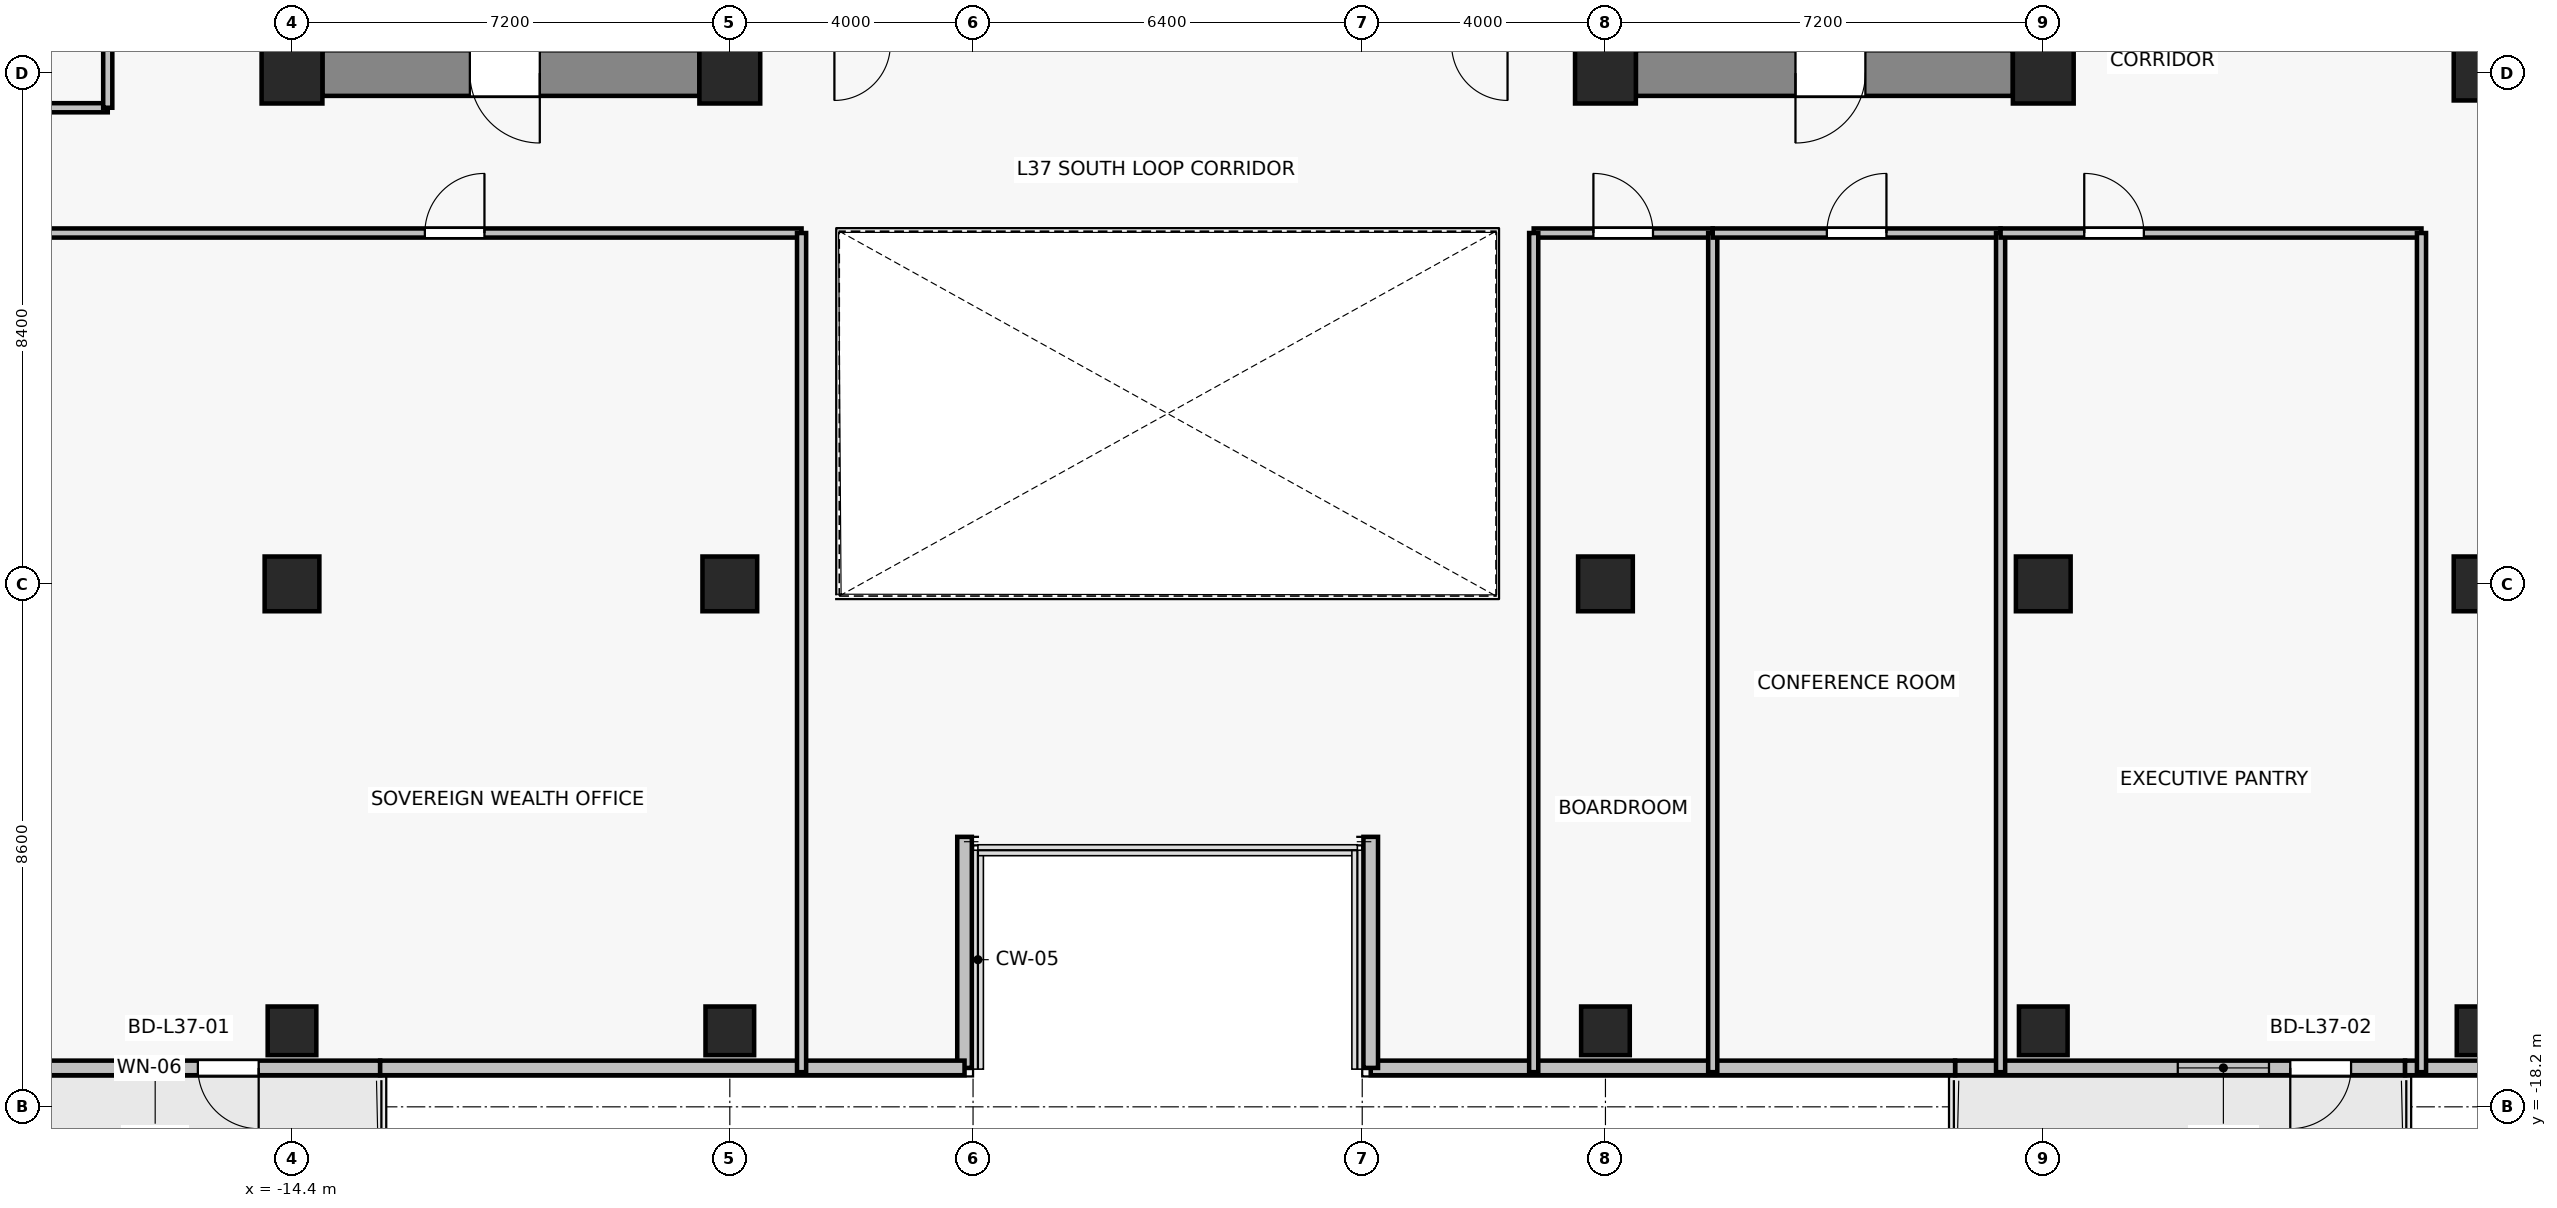
"""IFC4 building model, lengths in metres.
Left out: names, types, materials, properties, quantities, classifications, styles, units other than length and angle.
Written with IfcOpenShell. Run it as: python <this file> out.ifc"""

import sys

from ifc_helpers import new_model, si_unit, direction, frame, frame_2d, origin, origin_2d, place, context, subcontext, project, spatial, rectangle, extrude, source, transform, mapped, element, fill, save


model = new_model("IFC4")
c1 = context("Model", 3, precision=1e-05, world=origin(), true_north=direction((0.0, 1.0)))
c2 = subcontext(c1, "Body", "Model", "MODEL_VIEW")
j1 = project(units=[si_unit("LENGTHUNIT", "METRE"), si_unit("PLANEANGLEUNIT", "RADIAN")], contexts=[c1])
p1 = place(None, origin())
s1 = spatial("IfcSite", under=j1, at=p1, CompositionType="ELEMENT")
p2 = place(p1, origin())
s2 = spatial("IfcBuilding", under=s1, at=p2, CompositionType="ELEMENT")
p3 = place(p2, frame((0.0, 0.0, 133.0)))
s3 = spatial("IfcBuildingStorey", under=s2, at=p3, CompositionType="ELEMENT", Elevation=133.0)
for number, where, z_axis, x_axis in (
    (1, (-14.4, -1.2, 0.0), (0.0, 0.0, 1.0), (1.0, 0.0, 0.0)),
    (2, (-7.2, -1.2, 0.0), (0.0, 0.0, 1.0), (1.0, 0.0, 0.0)),
    (3, (7.2, -1.2, 0.0), (0.0, 0.0, 1.0), (1.0, 0.0, 0.0)),
    (4, (14.4, -1.2, 0.0), (0.0, 0.0, 1.0), (1.0, 0.0, 0.0)),
):
    element("IfcColumn", number, at=place(p3, frame(where, z_axis=z_axis, x_axis=x_axis)), inside=s3, PredefinedType="COLUMN", context=c2, shape_type="SweptSolid", body=[
        extrude(rectangle(XDim=1.0, YDim=1.0, at=origin_2d()), origin(), (0.0, 0.0, 1.0), 3.3),
    ])
for number, where, z_axis, x_axis in (
    (5, (-14.4, -9.6, 0.0), (0.0, 0.0, 1.0), (1.0, 0.0, 0.0)),
    (6, (-7.2, -9.6, 0.0), (0.0, 0.0, 1.0), (1.0, 0.0, 0.0)),
    (7, (7.2, -9.6, 0.0), (0.0, 0.0, 1.0), (1.0, 0.0, 0.0)),
    (8, (14.4, -9.6, 0.0), (0.0, 0.0, 1.0), (1.0, 0.0, 0.0)),
    (9, (21.6, -9.6, 0.0), (0.0, 0.0, 1.0), (1.0, 0.0, 0.0)),
    (10, (21.6, -1.2, 0.0), (0.0, 0.0, 1.0), (1.0, 0.0, 0.0)),
):
    element("IfcColumn", number, at=place(p3, frame(where, z_axis=z_axis, x_axis=x_axis)), inside=s3, PredefinedType="COLUMN", context=c2, shape_type="SweptSolid", body=[
        extrude(rectangle(XDim=0.9, YDim=0.9, at=origin_2d()), origin(), (0.0, 0.0, 1.0), 3.3),
    ])
for number, where, z_axis, x_axis in (
    (11, (-14.4, -16.95, 0.0), (0.0, 0.0, 1.0), (1.0, 0.0, 0.0)),
    (12, (-7.2, -16.95, 0.0), (0.0, 0.0, 1.0), (1.0, 0.0, 0.0)),
    (13, (7.2, -16.95, 0.0), (0.0, 0.0, 1.0), (1.0, 0.0, 0.0)),
    (14, (14.4, -16.95, 0.0), (0.0, 0.0, 1.0), (1.0, 0.0, 0.0)),
    (15, (21.6, -16.95, 0.0), (0.0, 0.0, 1.0), (1.0, 0.0, 0.0)),
):
    element("IfcColumn", number, at=place(p3, frame(where, z_axis=z_axis, x_axis=x_axis)), inside=s3, PredefinedType="COLUMN", context=c2, shape_type="SweptSolid", body=[
        extrude(rectangle(XDim=0.8, YDim=0.8, at=origin_2d()), origin(), (0.0, 0.0, 1.0), 3.3),
    ])
p4 = place(p3, frame((-7.7, -1.2, 0.0), z_axis=(0.0, 0.0, 1.0), x_axis=(-1.0, 0.0, 0.0)))
e16 = element("IfcWall", 16, at=p4, inside=s3, PredefinedType="SHEAR", context=c2, shape_type="SweptSolid", body=[
    extrude(rectangle(XDim=6.2, YDim=0.75, at=frame_2d((3.1, 0.0))), origin(), (0.0, 0.0, 1.0), 3.075),
])
p5 = place(p4, frame((2.625, 0.0, 0.0)))
e17 = element("IfcOpeningElement", 17, at=p5, cuts=e16, PredefinedType="OPENING", context=c2, shape_type="SweptSolid", body=[
    extrude(rectangle(XDim=1.15, YDim=2.15, at=frame_2d((0.575, 1.075))), frame((0.0, 0.385, 0.0), z_axis=(0.0, -1.0, 0.0), x_axis=(1.0, 0.0, 0.0)), (0.0, 0.0, 1.0), 0.77),
])
p6 = place(p3, frame((13.9, -1.2, 0.0), z_axis=(0.0, 0.0, 1.0), x_axis=(-1.0, 0.0, 0.0)))
e18 = element("IfcWall", 18, at=p6, inside=s3, PredefinedType="SHEAR", context=c2, shape_type="SweptSolid", body=[
    extrude(rectangle(XDim=6.2, YDim=0.75, at=frame_2d((3.1, 0.0))), origin(), (0.0, 0.0, 1.0), 3.075),
])
p7 = place(p6, frame((2.425, 0.0, 0.0)))
e19 = element("IfcOpeningElement", 19, at=p7, cuts=e18, PredefinedType="OPENING", context=c2, shape_type="SweptSolid", body=[
    extrude(rectangle(XDim=1.15, YDim=2.15, at=frame_2d((0.575, 1.075))), frame((0.0, 0.385, 0.0), z_axis=(0.0, -1.0, 0.0), x_axis=(1.0, 0.0, 0.0)), (0.0, 0.0, 1.0), 0.77),
])
p8 = place(p3, frame((-12.95, -17.56, 0.0), z_axis=(0.0, 0.0, 1.0), x_axis=(-1.0, 0.0, 0.0)))
e20 = element("IfcWall", 20, at=p8, inside=s3, PredefinedType="SOLIDWALL", context=c2, shape_type="SweptSolid", body=[
    extrude(rectangle(XDim=7.4, YDim=0.24, at=frame_2d((3.7, 0.0))), origin(), (0.0, 0.0, 1.0), 2.665),
])
p9 = place(p8, frame((1.998, 0.0, 0.0)))
e21 = element("IfcOpeningElement", 21, at=p9, cuts=e20, PredefinedType="OPENING", context=c2, shape_type="SweptSolid", body=[
    extrude(rectangle(XDim=1.0, YDim=2.2, at=frame_2d((0.5, 1.1))), frame((0.0, 0.13, 0.0), z_axis=(0.0, -1.0, 0.0), x_axis=(1.0, 0.0, 0.0)), (0.0, 0.0, 1.0), 0.26),
])
p10 = place(p8, frame((3.348, 0.0, 0.85)))
e22 = element("IfcOpeningElement", 22, at=p10, cuts=e20, PredefinedType="OPENING", context=c2, shape_type="SweptSolid", body=[
    extrude(rectangle(XDim=0.9, YDim=1.35, at=frame_2d((0.45, 0.675))), frame((0.0, 0.13, 0.0), z_axis=(0.0, -1.0, 0.0), x_axis=(1.0, 0.0, 0.0)), (0.0, 0.0, 1.0), 0.26),
])
p11 = place(p3, frame((20.35, -17.56, 0.0), z_axis=(0.0, 0.0, 1.0), x_axis=(-1.0, 0.0, 0.0)))
e23 = element("IfcWall", 23, at=p11, inside=s3, PredefinedType="SOLIDWALL", context=c2, shape_type="SweptSolid", body=[
    extrude(rectangle(XDim=7.4, YDim=0.24, at=frame_2d((3.7, 0.0))), origin(), (0.0, 0.0, 1.0), 2.665),
])
p12 = place(p11, frame((0.888, 0.0, 0.0)))
e24 = element("IfcOpeningElement", 24, at=p12, cuts=e23, PredefinedType="OPENING", context=c2, shape_type="SweptSolid", body=[
    extrude(rectangle(XDim=1.0, YDim=2.2, at=frame_2d((0.5, 1.1))), frame((0.0, 0.13, 0.0), z_axis=(0.0, -1.0, 0.0), x_axis=(1.0, 0.0, 0.0)), (0.0, 0.0, 1.0), 0.26),
])
p13 = place(p11, frame((2.238, 0.0, 0.85)))
e25 = element("IfcOpeningElement", 25, at=p13, cuts=e23, PredefinedType="OPENING", context=c2, shape_type="SweptSolid", body=[
    extrude(rectangle(XDim=1.5, YDim=1.6, at=frame_2d((0.75, 0.8))), frame((0.0, 0.13, 0.0), z_axis=(0.0, -1.0, 0.0), x_axis=(1.0, 0.0, 0.0)), (0.0, 0.0, 1.0), 0.26),
])
p14 = place(p3, frame((20.35, -17.56, 0.0), z_axis=(0.0, 0.0, 1.0), x_axis=(1.0, 0.0, 0.0)))
e26 = element("IfcWall", 26, at=p14, inside=s3, PredefinedType="SOLIDWALL", context=c2, shape_type="SweptSolid", body=[
    extrude(rectangle(XDim=6.11, YDim=0.24, at=frame_2d((3.055, 0.0))), origin(), (0.0, 0.0, 1.0), 3.075),
])
p15 = place(p3, frame((3.34, -17.56, 0.0), z_axis=(0.0, 0.0, 1.0), x_axis=(1.0, 0.0, 0.0)))
e27 = element("IfcWall", 27, at=p15, inside=s3, PredefinedType="SOLIDWALL", context=c2, shape_type="SweptSolid", body=[
    extrude(rectangle(XDim=9.61, YDim=0.24, at=frame_2d((4.805, 0.0))), origin(), (0.0, 0.0, 1.0), 2.665),
])
for number, where, z_axis, x_axis in (
    (28, (3.34, -13.76, 0.0), (0.0, 0.0, 1.0), (0.0, -1.0, 0.0)),
    (29, (-3.34, -17.56, 0.0), (0.0, 0.0, 1.0), (0.0, 1.0, 0.0)),
):
    element("IfcWall", number, at=place(p3, frame(where, z_axis=z_axis, x_axis=x_axis)), inside=s3, PredefinedType="SOLIDWALL", context=c2, shape_type="SweptSolid", body=[
        extrude(rectangle(XDim=3.8, YDim=0.24, at=frame_2d((1.9, 0.0))), origin(), (0.0, 0.0, 1.0), 2.515),
    ])
p16 = place(p3, frame((-12.95, -17.56, 0.0), z_axis=(0.0, 0.0, 1.0), x_axis=(1.0, 0.0, 0.0)))
e30 = element("IfcWall", 30, at=p16, inside=s3, PredefinedType="SOLIDWALL", context=c2, shape_type="SweptSolid", body=[
    extrude(rectangle(XDim=9.61, YDim=0.24, at=frame_2d((4.805, 0.0))), origin(), (0.0, 0.0, 1.0), 2.665),
])
p17 = place(p3, frame((-25.53, -3.83, 0.0), z_axis=(0.0, 0.0, 1.0), x_axis=(1.0, 0.0, 0.0)))
e31 = element("IfcWall", 31, at=p17, inside=s3, PredefinedType="PARTITIONING", context=c2, shape_type="SweptSolid", body=[
    extrude(rectangle(XDim=19.51, YDim=0.15, at=frame_2d((9.755, 0.0))), origin(), (0.0, 0.0, 1.0), 2.515),
])
p18 = place(p17, frame((13.315, 0.0, 0.0)))
e32 = element("IfcOpeningElement", 32, at=p18, cuts=e31, PredefinedType="OPENING", context=c2, shape_type="SweptSolid", body=[
    extrude(rectangle(XDim=0.98, YDim=2.15, at=frame_2d((0.49, 1.075))), frame((0.0, 0.085, 0.0), z_axis=(0.0, -1.0, 0.0), x_axis=(1.0, 0.0, 0.0)), (0.0, 0.0, 1.0), 0.17),
])
p19 = place(p3, frame((-6.02, -3.83, 0.0), z_axis=(0.0, 0.0, 1.0), x_axis=(0.0, -1.0, 0.0)))
e33 = element("IfcWall", 33, at=p19, inside=s3, PredefinedType="PARTITIONING", context=c2, shape_type="SweptSolid", body=[
    extrude(rectangle(XDim=13.8, YDim=0.15, at=frame_2d((6.9, 0.0))), origin(), (0.0, 0.0, 1.0), 2.515),
])
p20 = place(p3, frame((6.02, -3.83, 0.0), z_axis=(0.0, 0.0, 1.0), x_axis=(1.0, 0.0, 0.0)))
e34 = element("IfcWall", 34, at=p20, inside=s3, PredefinedType="PARTITIONING", context=c2, shape_type="SweptSolid", body=[
    extrude(rectangle(XDim=2.944, YDim=0.15, at=frame_2d((1.472, 0.0))), origin(), (0.0, 0.0, 1.0), 2.515),
])
p21 = place(p20, frame((0.982, 0.0, 0.0)))
e35 = element("IfcOpeningElement", 35, at=p21, cuts=e34, PredefinedType="OPENING", context=c2, shape_type="SweptSolid", body=[
    extrude(rectangle(XDim=0.98, YDim=2.15, at=frame_2d((0.49, 1.075))), frame((0.0, 0.085, 0.0), z_axis=(0.0, -1.0, 0.0), x_axis=(1.0, 0.0, 0.0)), (0.0, 0.0, 1.0), 0.17),
])
for number, where, z_axis, x_axis in (
    (36, (6.02, -17.63, 0.0), (0.0, 0.0, 1.0), (0.0, 1.0, 0.0)),
    (37, (8.964, -3.83, 0.0), (0.0, 0.0, 1.0), (0.0, -1.0, 0.0)),
):
    element("IfcWall", number, at=place(p3, frame(where, z_axis=z_axis, x_axis=x_axis)), inside=s3, PredefinedType="PARTITIONING", context=c2, shape_type="SweptSolid", body=[
        extrude(rectangle(XDim=13.8, YDim=0.15, at=frame_2d((6.9, 0.0))), origin(), (0.0, 0.0, 1.0), 2.515),
    ])
p22 = place(p3, frame((8.964, -3.83, 0.0), z_axis=(0.0, 0.0, 1.0), x_axis=(1.0, 0.0, 0.0)))
e38 = element("IfcWall", 38, at=p22, inside=s3, PredefinedType="PARTITIONING", context=c2, shape_type="SweptSolid", body=[
    extrude(rectangle(XDim=4.734, YDim=0.15, at=frame_2d((2.367, 0.0))), origin(), (0.0, 0.0, 1.0), 3.075),
])
p23 = place(p22, frame((1.877, 0.0, 0.0)))
e39 = element("IfcOpeningElement", 39, at=p23, cuts=e38, PredefinedType="OPENING", context=c2, shape_type="SweptSolid", body=[
    extrude(rectangle(XDim=0.98, YDim=2.15, at=frame_2d((0.49, 1.075))), frame((0.0, 0.085, 0.0), z_axis=(0.0, -1.0, 0.0), x_axis=(1.0, 0.0, 0.0)), (0.0, 0.0, 1.0), 0.17),
])
p24 = place(p3, frame((13.698, -3.83, 0.0), z_axis=(0.0, 0.0, 1.0), x_axis=(0.0, -1.0, 0.0)))
e40 = element("IfcWall", 40, at=p24, inside=s3, PredefinedType="PARTITIONING", context=c2, shape_type="SweptSolid", body=[
    extrude(rectangle(XDim=13.8, YDim=0.15, at=frame_2d((6.9, 0.0))), origin(), (0.0, 0.0, 1.0), 2.515),
])
p25 = place(p3, frame((13.698, -3.83, 0.0), z_axis=(0.0, 0.0, 1.0), x_axis=(1.0, 0.0, 0.0)))
e41 = element("IfcWall", 41, at=p25, inside=s3, PredefinedType="PARTITIONING", context=c2, shape_type="SweptSolid", body=[
    extrude(rectangle(XDim=6.922, YDim=0.15, at=frame_2d((3.461, 0.0))), origin(), (0.0, 0.0, 1.0), 2.515),
])
p26 = place(p25, frame((1.376, 0.0, 0.0)))
e42 = element("IfcOpeningElement", 42, at=p26, cuts=e41, PredefinedType="OPENING", context=c2, shape_type="SweptSolid", body=[
    extrude(rectangle(XDim=0.98, YDim=2.15, at=frame_2d((0.49, 1.075))), frame((0.0, 0.085, 0.0), z_axis=(0.0, -1.0, 0.0), x_axis=(1.0, 0.0, 0.0)), (0.0, 0.0, 1.0), 0.17),
])
p27 = place(p3, frame((20.62, -3.83, 0.0), z_axis=(0.0, 0.0, 1.0), x_axis=(0.0, -1.0, 0.0)))
e43 = element("IfcWall", 43, at=p27, inside=s3, PredefinedType="PARTITIONING", context=c2, shape_type="SweptSolid", body=[
    extrude(rectangle(XDim=13.8, YDim=0.15, at=frame_2d((6.9, 0.0))), origin(), (0.0, 0.0, 1.0), 2.515),
])
p28 = place(p3, frame((-17.43, -1.77, 0.0), z_axis=(0.0, 0.0, 1.0), x_axis=(-1.0, 0.0, 0.0)))
e44 = element("IfcWall", 44, at=p28, inside=s3, PredefinedType="PARTITIONING", context=c2, shape_type="SweptSolid", body=[
    extrude(rectangle(XDim=8.1, YDim=0.15, at=frame_2d((4.05, 0.0))), origin(), (0.0, 0.0, 1.0), 2.515),
])
p29 = place(p3, frame((-17.43, 13.88, 0.0), z_axis=(0.0, 0.0, 1.0), x_axis=(0.0, -1.0, 0.0)))
e45 = element("IfcWall", 45, at=p29, inside=s3, PredefinedType="PARTITIONING", context=c2, shape_type="SweptSolid", body=[
    extrude(rectangle(XDim=15.65, YDim=0.15, at=frame_2d((7.825, 0.0))), origin(), (0.0, 0.0, 1.0), 2.515),
])
p30 = place(p29, frame((7.335, 0.0, 0.0)))
e46 = element("IfcOpeningElement", 46, at=p30, cuts=e45, PredefinedType="OPENING", context=c2, shape_type="SweptSolid", body=[
    extrude(rectangle(XDim=0.98, YDim=2.15, at=frame_2d((0.49, 1.075))), frame((0.0, 0.085, 0.0), z_axis=(0.0, -1.0, 0.0), x_axis=(1.0, 0.0, 0.0)), (0.0, 0.0, 1.0), 0.17),
])
m1 = source(origin(), c2, "Body", "SweptSolid", [
    extrude(rectangle(XDim=1.0, YDim=2.2, at=frame_2d((0.5, 1.1))), frame((0.0, 0.025, 0.0), z_axis=(0.0, -1.0, 0.0), x_axis=(1.0, 0.0, 0.0)), (0.0, 0.0, 1.0), 0.05),
])
p31 = place(p9, origin())
e47 = element("IfcDoor", 47, at=p31, inside=s3, OperationType="SINGLE_SWING_LEFT", PredefinedType="DOOR", context=c2, shape_type="MappedRepresentation", body=[
    mapped(m1, transform((0.0, 0.0, 0.0), x_axis=(1.0, 0.0, 0.0), y_axis=(0.0, 1.0, 0.0), z_axis=(0.0, 0.0, 1.0), scale=1.0)),
])
fill(e21, e47)
m2 = source(origin(), c2, "Body", "SweptSolid", [
    extrude(rectangle(XDim=0.9, YDim=1.35, at=frame_2d((0.45, 0.675))), frame((0.0, 0.03, 0.0), z_axis=(0.0, -1.0, 0.0), x_axis=(1.0, 0.0, 0.0)), (0.0, 0.0, 1.0), 0.06),
])
p32 = place(p10, origin())
e48 = element("IfcWindow", 48, at=p32, inside=s3, PartitioningType="SINGLE_PANEL", PredefinedType="WINDOW", context=c2, shape_type="MappedRepresentation", body=[
    mapped(m2, transform((0.0, 0.0, 0.0), x_axis=(1.0, 0.0, 0.0), y_axis=(0.0, 1.0, 0.0), z_axis=(0.0, 0.0, 1.0), scale=1.0)),
])
fill(e22, e48)
p33 = place(p12, origin())
e49 = element("IfcDoor", 49, at=p33, inside=s3, OperationType="SINGLE_SWING_RIGHT", PredefinedType="DOOR", context=c2, shape_type="MappedRepresentation", body=[
    mapped(m1, transform((0.0, 0.0, 0.0), x_axis=(1.0, 0.0, 0.0), y_axis=(0.0, 1.0, 0.0), z_axis=(0.0, 0.0, 1.0), scale=1.0)),
])
fill(e24, e49)
m3 = source(origin(), c2, "Body", "SweptSolid", [
    extrude(rectangle(XDim=1.5, YDim=1.6, at=frame_2d((0.75, 0.8))), frame((0.0, 0.03, 0.0), z_axis=(0.0, -1.0, 0.0), x_axis=(1.0, 0.0, 0.0)), (0.0, 0.0, 1.0), 0.06),
])
p34 = place(p13, origin())
e50 = element("IfcWindow", 50, at=p34, inside=s3, PartitioningType="SINGLE_PANEL", PredefinedType="WINDOW", context=c2, shape_type="MappedRepresentation", body=[
    mapped(m3, transform((0.0, 0.0, 0.0), x_axis=(1.0, 0.0, 0.0), y_axis=(0.0, 1.0, 0.0), z_axis=(0.0, 0.0, 1.0), scale=1.0)),
])
fill(e25, e50)
m4 = source(origin(), c2, "Body", "SweptSolid", [
    extrude(rectangle(XDim=1.15, YDim=2.15, at=frame_2d((0.575, 1.075))), frame((0.0, 0.025, 0.0), z_axis=(0.0, -1.0, 0.0), x_axis=(1.0, 0.0, 0.0)), (0.0, 0.0, 1.0), 0.05),
])
p35 = place(p5, origin())
e51 = element("IfcDoor", 51, at=p35, inside=s3, OperationType="SINGLE_SWING_LEFT", PredefinedType="DOOR", context=c2, shape_type="MappedRepresentation", body=[
    mapped(m4, transform((0.0, 0.0, 0.0), x_axis=(1.0, 0.0, 0.0), y_axis=(0.0, 1.0, 0.0), z_axis=(0.0, 0.0, 1.0), scale=1.0)),
])
fill(e17, e51)
p36 = place(p7, origin())
e52 = element("IfcDoor", 52, at=p36, inside=s3, OperationType="SINGLE_SWING_RIGHT", PredefinedType="DOOR", context=c2, shape_type="MappedRepresentation", body=[
    mapped(m4, transform((0.0, 0.0, 0.0), x_axis=(1.0, 0.0, 0.0), y_axis=(0.0, 1.0, 0.0), z_axis=(0.0, 0.0, 1.0), scale=1.0)),
])
fill(e19, e52)
m5 = source(origin(), c2, "Body", "SweptSolid", [
    extrude(rectangle(XDim=0.98, YDim=2.15, at=frame_2d((0.49, 1.075))), frame((0.0, 0.025, 0.0), z_axis=(0.0, -1.0, 0.0), x_axis=(1.0, 0.0, 0.0)), (0.0, 0.0, 1.0), 0.05),
])
p37 = place(p18, origin())
e53 = element("IfcDoor", 53, at=p37, inside=s3, OperationType="SINGLE_SWING_RIGHT", PredefinedType="DOOR", context=c2, shape_type="MappedRepresentation", body=[
    mapped(m5, transform((0.0, 0.0, 0.0), x_axis=(1.0, 0.0, 0.0), y_axis=(0.0, 1.0, 0.0), z_axis=(0.0, 0.0, 1.0), scale=1.0)),
])
fill(e32, e53)
p38 = place(p21, origin())
e54 = element("IfcDoor", 54, at=p38, inside=s3, OperationType="SINGLE_SWING_LEFT", PredefinedType="DOOR", context=c2, shape_type="MappedRepresentation", body=[
    mapped(m5, transform((0.0, 0.0, 0.0), x_axis=(1.0, 0.0, 0.0), y_axis=(0.0, 1.0, 0.0), z_axis=(0.0, 0.0, 1.0), scale=1.0)),
])
fill(e35, e54)
p39 = place(p23, origin())
e55 = element("IfcDoor", 55, at=p39, inside=s3, OperationType="SINGLE_SWING_RIGHT", PredefinedType="DOOR", context=c2, shape_type="MappedRepresentation", body=[
    mapped(m5, transform((0.0, 0.0, 0.0), x_axis=(1.0, 0.0, 0.0), y_axis=(0.0, 1.0, 0.0), z_axis=(0.0, 0.0, 1.0), scale=1.0)),
])
fill(e39, e55)
p40 = place(p26, origin())
e56 = element("IfcDoor", 56, at=p40, inside=s3, OperationType="SINGLE_SWING_LEFT", PredefinedType="DOOR", context=c2, shape_type="MappedRepresentation", body=[
    mapped(m5, transform((0.0, 0.0, 0.0), x_axis=(1.0, 0.0, 0.0), y_axis=(0.0, 1.0, 0.0), z_axis=(0.0, 0.0, 1.0), scale=1.0)),
])
fill(e42, e56)
save(model, sys.argv[1])
